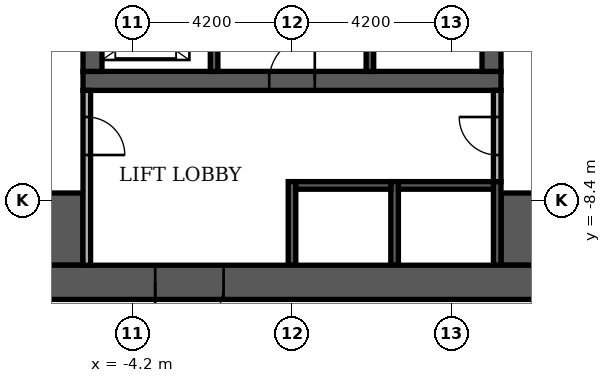
"""IFC4 building model, lengths in metres.
Left out: names, types, materials, properties, quantities, classifications, styles, units other than length and angle.
Written with IfcOpenShell. Run it as: python <this file> out.ifc"""

import sys

from ifc_helpers import new_model, si_unit, direction, frame, frame_2d, origin, place, context, subcontext, project, spatial, rectangle, extrude, element, fill, save


model = new_model("IFC4")
c1 = context("Model", 3, precision=1e-05, world=origin(), true_north=direction((0.0, 1.0)))
c2 = subcontext(c1, "Body", "Model", "MODEL_VIEW")
j1 = project(units=[si_unit("LENGTHUNIT", "METRE"), si_unit("PLANEANGLEUNIT", "RADIAN")], contexts=[c1])
p1 = place(None, origin())
s1 = spatial("IfcSite", under=j1, at=p1, CompositionType="ELEMENT")
p2 = place(p1, origin())
s2 = spatial("IfcBuilding", under=s1, at=p2, CompositionType="ELEMENT")
p3 = place(p2, frame((0.0, 0.0, 7.2)))
s3 = spatial("IfcBuildingStorey", under=s2, at=p3, CompositionType="ELEMENT", Elevation=7.2)
p4 = place(p3, frame((-5.5, -5.25, 0.0), z_axis=(0.0, 0.0, 1.0), x_axis=(1.0, 0.0, 0.0)))
e1 = element("IfcWall", 1, at=p4, inside=s3, PredefinedType="SHEAR", context=c2, shape_type="SweptSolid", body=[
    extrude(rectangle(XDim=11.0, YDim=0.5, at=frame_2d((5.5, 0.0))), origin(), (0.0, 0.0, 1.0), 4.38),
])
p5 = place(p4, frame((4.9, 0.0, 0.0)))
e2 = element("IfcOpeningElement", 2, at=p5, cuts=e1, PredefinedType="OPENING", context=c2, shape_type="SweptSolid", body=[
    extrude(rectangle(XDim=1.2, YDim=2.1, at=frame_2d((0.6, 1.05))), frame((0.0, 0.26, 0.0), z_axis=(0.0, -1.0, 0.0), x_axis=(1.0, 0.0, 0.0)), (0.0, 0.0, 1.0), 0.52),
])
for number, where, z_axis, x_axis in (
    (3, (-5.25, -5.0, 0.0), (0.0, 0.0, 1.0), (0.0, 1.0, 0.0)),
    (4, (5.25, -5.0, 0.0), (0.0, 0.0, 1.0), (0.0, 1.0, 0.0)),
):
    element("IfcWall", number, at=place(p3, frame(where, z_axis=z_axis, x_axis=x_axis)), inside=s3, PredefinedType="SHEAR", context=c2, shape_type="SweptSolid", body=[
        extrude(rectangle(XDim=10.5, YDim=0.5, at=frame_2d((5.25, 0.0))), origin(), (0.0, 0.0, 1.0), 4.38),
    ])
for number, where, z_axis, x_axis in (
    (5, (-10.1, -9.15, 0.0), (0.0, 0.0, 1.0), (1.0, 0.0, 0.0)),
    (6, (5.5, -9.15, 0.0), (0.0, 0.0, 1.0), (1.0, 0.0, 0.0)),
):
    element("IfcWall", number, at=place(p3, frame(where, z_axis=z_axis, x_axis=x_axis)), inside=s3, PredefinedType="SHEAR", context=c2, shape_type="SweptSolid", body=[
        extrude(rectangle(XDim=4.6, YDim=1.9, at=frame_2d((2.3, 0.0))), origin(), (0.0, 0.0, 1.0), 4.38),
    ])
p6 = place(p3, frame((2.05, -5.0, 0.0), z_axis=(0.0, 0.0, 1.0), x_axis=(0.0, 1.0, 0.0)))
e7 = element("IfcWall", 7, at=p6, inside=s3, PredefinedType="SHEAR", context=c2, shape_type="SweptSolid", body=[
    extrude(rectangle(XDim=6.6, YDim=0.2, at=frame_2d((3.3, 0.0))), origin(), (0.0, 0.0, 1.0), 4.38),
])
p7 = place(p6, frame((5.25, 0.0, 0.0)))
e8 = element("IfcOpeningElement", 8, at=p7, cuts=e7, PredefinedType="OPENING", context=c2, shape_type="SweptSolid", body=[
    extrude(rectangle(XDim=1.0, YDim=2.1, at=frame_2d((0.5, 1.05))), frame((0.0, 0.11, 0.0), z_axis=(0.0, -1.0, 0.0), x_axis=(1.0, 0.0, 0.0)), (0.0, 0.0, 1.0), 0.22),
])
for number, where, z_axis, x_axis in (
    (9, (0.0, -10.1, 0.0), (0.0, 0.0, 1.0), (0.0, 1.0, 0.0)),
    (10, (2.7, -10.1, 0.0), (0.0, 0.0, 1.0), (0.0, 1.0, 0.0)),
    (11, (5.4, -10.1, 0.0), (0.0, 0.0, 1.0), (0.0, 1.0, 0.0)),
):
    element("IfcWall", number, at=place(p3, frame(where, z_axis=z_axis, x_axis=x_axis)), inside=s3, PredefinedType="SHEAR", context=c2, shape_type="SweptSolid", body=[
        extrude(rectangle(XDim=2.2, YDim=0.2, at=frame_2d((1.1, 0.0))), origin(), (0.0, 0.0, 1.0), 4.38),
    ])
for number, where, z_axis, x_axis in (
    (12, (0.1, -8.0, 0.0), (0.0, 0.0, 1.0), (1.0, 0.0, 0.0)),
    (13, (2.8, -8.0, 0.0), (0.0, 0.0, 1.0), (1.0, 0.0, 0.0)),
):
    element("IfcWall", number, at=place(p3, frame(where, z_axis=z_axis, x_axis=x_axis)), inside=s3, PredefinedType="SHEAR", context=c2, shape_type="SweptSolid", body=[
        extrude(rectangle(XDim=2.5, YDim=0.2, at=frame_2d((1.25, 0.0))), origin(), (0.0, 0.0, 1.0), 4.38),
    ])
p8 = place(p3, frame((-2.05, -5.0, 0.0), z_axis=(0.0, 0.0, 1.0), x_axis=(0.0, 1.0, 0.0)))
e14 = element("IfcWall", 14, at=p8, inside=s3, PredefinedType="SHEAR", context=c2, shape_type="SweptSolid", body=[
    extrude(rectangle(XDim=3.4, YDim=0.2, at=frame_2d((1.7, 0.0))), origin(), (0.0, 0.0, 1.0), 4.38),
])
p9 = place(p8, frame((0.55, 0.0, 0.0)))
e15 = element("IfcOpeningElement", 15, at=p9, cuts=e14, PredefinedType="OPENING", context=c2, shape_type="SweptSolid", body=[
    extrude(rectangle(XDim=1.1, YDim=2.1, at=frame_2d((0.55, 1.05))), frame((0.0, 0.11, 0.0), z_axis=(0.0, -1.0, 0.0), x_axis=(1.0, 0.0, 0.0)), (0.0, 0.0, 1.0), 0.22),
])
p10 = place(p8, frame((2.45, 0.0, 0.0)))
e16 = element("IfcOpeningElement", 16, at=p10, cuts=e14, PredefinedType="OPENING", context=c2, shape_type="SweptSolid", body=[
    extrude(rectangle(XDim=0.8, YDim=2.1, at=frame_2d((0.4, 1.05))), frame((0.0, 0.11, 0.0), z_axis=(0.0, -1.0, 0.0), x_axis=(1.0, 0.0, 0.0)), (0.0, 0.0, 1.0), 0.22),
])
p11 = place(p3, frame((-11.0, -10.55, 0.0), z_axis=(0.0, 0.0, 1.0), x_axis=(1.0, 0.0, 0.0)))
e17 = element("IfcWall", 17, at=p11, inside=s3, PredefinedType="SHEAR", context=c2, shape_type="SweptSolid", body=[
    extrude(rectangle(XDim=22.0, YDim=0.9, at=frame_2d((11.0, 0.0))), origin(), (0.0, 0.0, 1.0), 4.38),
])
p12 = place(p11, frame((7.4, 0.0, 0.0)))
e18 = element("IfcOpeningElement", 18, at=p12, cuts=e17, PredefinedType="OPENING", context=c2, shape_type="SweptSolid", body=[
    extrude(rectangle(XDim=1.8, YDim=2.2, at=frame_2d((0.9, 1.1))), frame((0.0, 0.46, 0.0), z_axis=(0.0, -1.0, 0.0), x_axis=(1.0, 0.0, 0.0)), (0.0, 0.0, 1.0), 0.92),
])
p13 = place(p3, frame((-5.4, -10.1, 0.0), z_axis=(0.0, 0.0, 1.0), x_axis=(0.0, 1.0, 0.0)))
e19 = element("IfcWall", 19, at=p13, inside=s3, PredefinedType="PARTITIONING", context=c2, shape_type="SweptSolid", body=[
    extrude(rectangle(XDim=4.6, YDim=0.2, at=frame_2d((2.3, 0.0))), origin(), (0.0, 0.0, 1.0), 4.38),
])
p14 = place(p13, frame((2.9, 0.0, 0.0)))
e20 = element("IfcOpeningElement", 20, at=p14, cuts=e19, PredefinedType="OPENING", context=c2, shape_type="SweptSolid", body=[
    extrude(rectangle(XDim=1.0, YDim=2.1, at=frame_2d((0.5, 1.05))), frame((0.0, 0.11, 0.0), z_axis=(0.0, -1.0, 0.0), x_axis=(1.0, 0.0, 0.0)), (0.0, 0.0, 1.0), 0.22),
])
p15 = place(p3, frame((5.4, -7.9, 0.0), z_axis=(0.0, 0.0, 1.0), x_axis=(0.0, 1.0, 0.0)))
e21 = element("IfcWall", 21, at=p15, inside=s3, PredefinedType="PARTITIONING", context=c2, shape_type="SweptSolid", body=[
    extrude(rectangle(XDim=2.4, YDim=0.2, at=frame_2d((1.2, 0.0))), origin(), (0.0, 0.0, 1.0), 4.38),
])
p16 = place(p15, frame((0.7, 0.0, 0.0)))
e22 = element("IfcOpeningElement", 22, at=p16, cuts=e21, PredefinedType="OPENING", context=c2, shape_type="SweptSolid", body=[
    extrude(rectangle(XDim=1.0, YDim=2.1, at=frame_2d((0.5, 1.05))), frame((0.0, 0.11, 0.0), z_axis=(0.0, -1.0, 0.0), x_axis=(1.0, 0.0, 0.0)), (0.0, 0.0, 1.0), 0.22),
])
p17 = place(p5, origin())
e23 = element("IfcDoor", 23, at=p17, inside=s3, OperationType="SINGLE_SWING_RIGHT", PredefinedType="DOOR", context=c2, shape_type="SweptSolid", body=[
    extrude(rectangle(XDim=1.2, YDim=2.1, at=frame_2d((0.6, 1.05))), frame((0.0, 0.025, 0.0), z_axis=(0.0, -1.0, 0.0), x_axis=(1.0, 0.0, 0.0)), (0.0, 0.0, 1.0), 0.05),
])
fill(e2, e23)
p18 = place(p14, frame((1.0, 0.0, 0.0), z_axis=(0.0, 0.0, 1.0), x_axis=(-1.0, 0.0, 0.0)))
e24 = element("IfcDoor", 24, at=p18, inside=s3, OperationType="SINGLE_SWING_LEFT", PredefinedType="DOOR", context=c2, shape_type="SweptSolid", body=[
    extrude(rectangle(XDim=1.0, YDim=2.1, at=frame_2d((0.5, 1.05))), frame((0.0, 0.025, 0.0), z_axis=(0.0, -1.0, 0.0), x_axis=(1.0, 0.0, 0.0)), (0.0, 0.0, 1.0), 0.05),
])
fill(e20, e24)
p19 = place(p16, origin())
e25 = element("IfcDoor", 25, at=p19, inside=s3, OperationType="SINGLE_SWING_RIGHT", PredefinedType="DOOR", context=c2, shape_type="SweptSolid", body=[
    extrude(rectangle(XDim=1.0, YDim=2.1, at=frame_2d((0.5, 1.05))), frame((0.0, 0.025, 0.0), z_axis=(0.0, -1.0, 0.0), x_axis=(1.0, 0.0, 0.0)), (0.0, 0.0, 1.0), 0.05),
])
fill(e22, e25)
p20 = place(p12, frame((1.8, 0.0, 0.0), z_axis=(0.0, 0.0, 1.0), x_axis=(-1.0, 0.0, 0.0)))
e26 = element("IfcDoor", 26, at=p20, inside=s3, OperationType="DOUBLE_DOOR_SINGLE_SWING", PredefinedType="DOOR", context=c2, shape_type="SweptSolid", body=[
    extrude(rectangle(XDim=1.8, YDim=2.2, at=frame_2d((0.9, 1.1))), frame((0.0, 0.025, 0.0), z_axis=(0.0, -1.0, 0.0), x_axis=(1.0, 0.0, 0.0)), (0.0, 0.0, 1.0), 0.05),
])
fill(e18, e26)
save(model, sys.argv[1])
